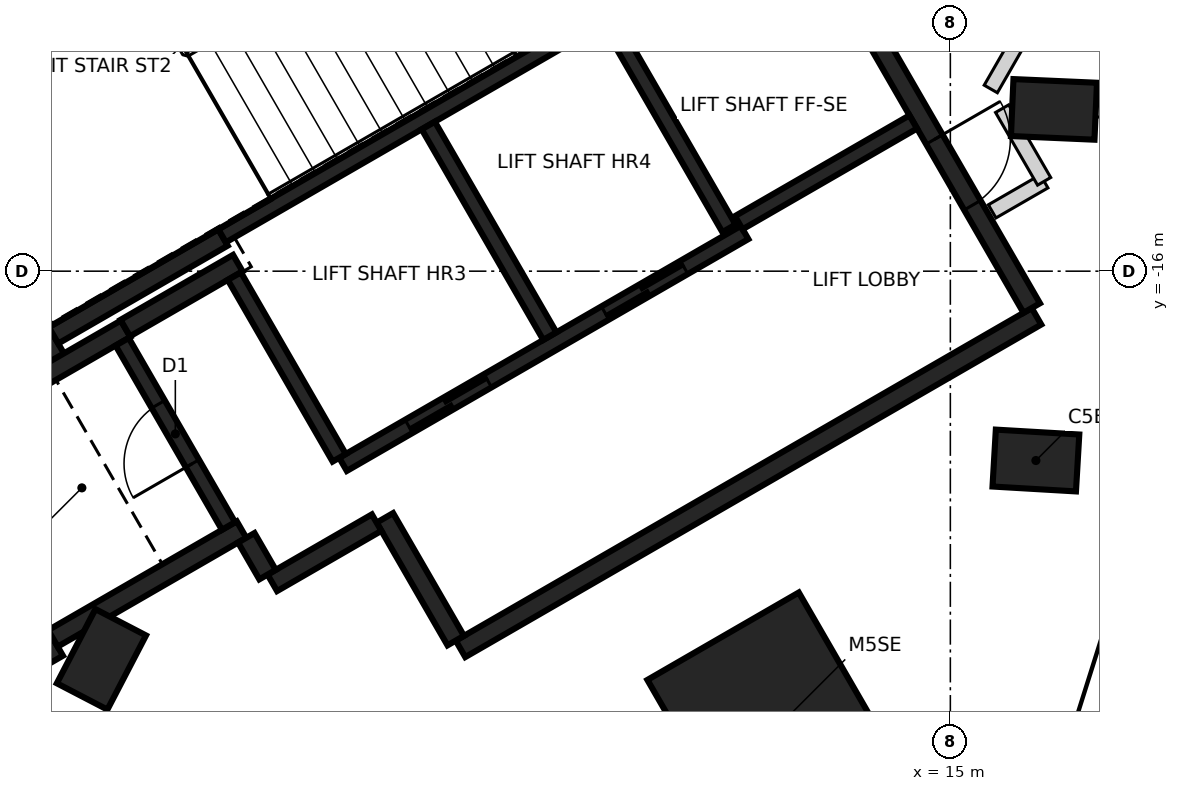
"""IFC4 building model, lengths in metres.
Left out: names, types, materials, properties, quantities, classifications, styles, units other than length and angle.
Written with IfcOpenShell. Run it as: python <this file> out.ifc"""

import sys

from ifc_helpers import new_model, si_unit, direction, frame, frame_2d, origin, origin_2d, place, context, subcontext, project, spatial, rectangle, extrude, element, fill, save


model = new_model("IFC4")
c1 = context("Model", 3, precision=1e-05, world=origin(), true_north=direction((0.0, 1.0)))
c2 = subcontext(c1, "Body", "Model", "MODEL_VIEW")
j1 = project(units=[si_unit("LENGTHUNIT", "METRE"), si_unit("PLANEANGLEUNIT", "RADIAN")], contexts=[c1])
p1 = place(None, origin())
s1 = spatial("IfcSite", under=j1, at=p1, CompositionType="ELEMENT")
p2 = place(p1, origin())
s2 = spatial("IfcBuilding", under=s1, at=p2, CompositionType="ELEMENT")
p3 = place(p2, frame((0.0, 0.0, 250.2)))
s3 = spatial("IfcBuildingStorey", under=s2, at=p3, CompositionType="ELEMENT", Elevation=250.2)
for number, where, z_axis, x_axis in (
    (1, (16.125, -18.491, -0.35), (0.0, 0.0, 1.0), (-0.998, 0.058, 0.0)),
    (2, (16.363, -13.872, -0.35), (0.0, 0.0, 1.0), (-0.999, 0.044, 0.0)),
    (3, (3.832, -21.107, -0.35), (0.0, 0.0, 1.0), (0.461, 0.887, 0.0)),
):
    element("IfcColumn", number, at=place(p3, frame(where, z_axis=z_axis, x_axis=x_axis)), inside=s3, PredefinedType="COLUMN", context=c2, shape_type="SweptSolid", body=[
        extrude(rectangle(XDim=1.1, YDim=0.75, at=origin_2d()), origin(), (0.0, 0.0, 1.0), 3.6),
    ])
p4 = place(p3, frame((12.71, -22.015, -0.35), z_axis=(0.0, 0.0, 1.0), x_axis=(-0.5, 0.866025403784, 0.0)))
e4 = element("IfcColumn", 4, at=p4, inside=s3, PredefinedType="COLUMN", context=c2, shape_type="SweptSolid", body=[
    extrude(rectangle(XDim=2.8, YDim=2.3, at=origin_2d()), origin(), (0.0, 0.0, 1.0), 3.6),
])
p5 = place(p3, frame((16.133, -16.594, 0.0), z_axis=(0.0, 0.0, 1.0), x_axis=(-0.866022959057, -0.500004234368, 0.0)))
e5 = element("IfcWall", 5, at=p5, inside=s3, PredefinedType="SHEAR", context=c2, shape_type="SweptSolid", body=[
    extrude(rectangle(XDim=8.75, YDim=0.25, at=frame_2d((4.375, 0.0))), origin(), (0.0, 0.0, 1.0), 3.25),
])
p6 = place(p3, frame((13.008, -11.181, 0.0), z_axis=(0.0, 0.0, 1.0), x_axis=(0.500001955336, -0.866024274868, 0.0)))
e6 = element("IfcWall", 6, at=p6, inside=s3, PredefinedType="SHEAR", context=c2, shape_type="SweptSolid", body=[
    extrude(rectangle(XDim=6.125, YDim=0.25, at=frame_2d((3.062, 0.0))), origin(), (0.0, 0.0, 1.0), 3.25),
])
p7 = place(p6, frame((3.563, 0.0, 0.0)))
e7 = element("IfcOpeningElement", 7, at=p7, cuts=e6, PredefinedType="OPENING", context=c2, shape_type="SweptSolid", body=[
    extrude(rectangle(XDim=1.0, YDim=2.1, at=frame_2d((0.5, 1.05))), frame((0.0, 0.135, 0.0), z_axis=(0.0, -1.0, 0.0), x_axis=(1.0, 0.0, 0.0)), (0.0, 0.0, 1.0), 0.27),
])
p8 = place(p3, frame((3.235, -17.153, 0.0), z_axis=(0.0, 0.0, 1.0), x_axis=(-0.500008851346, 0.866020293397, 0.0)))
e8 = element("IfcWall", 8, at=p8, inside=s3, PredefinedType="SHEAR", context=c2, shape_type="SweptSolid", body=[
    extrude(rectangle(XDim=5.51, YDim=0.25, at=frame_2d((2.755, 0.0))), origin(), (0.0, 0.0, 1.0), 3.25),
])
p9 = place(p3, frame((3.217, -21.122, 0.0), z_axis=(0.0, 0.0, 1.0), x_axis=(-0.499998874531, 0.866026053573, 0.0)))
e9 = element("IfcWall", 9, at=p9, inside=s3, PredefinedType="SHEAR", context=c2, shape_type="SweptSolid", body=[
    extrude(rectangle(XDim=3.313, YDim=0.25, at=frame_2d((1.656, 0.0))), origin(), (0.0, 0.0, 1.0), 3.25),
])
p10 = place(p3, frame((1.669, -18.19, 0.0), z_axis=(0.0, 0.0, 1.0), x_axis=(0.866042235819, 0.499970844928, 0.0)))
e10 = element("IfcWall", 10, at=p10, inside=s3, PredefinedType="SHEAR", context=c2, shape_type="SweptSolid", body=[
    extrude(rectangle(XDim=2.865, YDim=0.25, at=frame_2d((1.432, 0.0))), origin(), (0.0, 0.0, 1.0), 3.25),
])
p11 = place(p3, frame((5.675, -19.399, 0.0), z_axis=(0.0, 0.0, 1.0), x_axis=(-0.866026637627, -0.499997862916, 0.0)))
e11 = element("IfcWall", 11, at=p11, inside=s3, PredefinedType="SHEAR", context=c2, shape_type="SweptSolid", body=[
    extrude(rectangle(XDim=2.865, YDim=0.25, at=frame_2d((1.432, 0.0))), origin(), (0.0, 0.0, 1.0), 3.25),
])
p12 = place(p3, frame((5.431, -15.556, 0.0), z_axis=(0.0, 0.0, 1.0), x_axis=(-0.866022940537, -0.500004266446, 0.0)))
e12 = element("IfcWall", 12, at=p12, inside=s3, PredefinedType="SHEAR", context=c2, shape_type="SweptSolid", body=[
    extrude(rectangle(XDim=2.575, YDim=0.25, at=frame_2d((1.287, 0.0))), origin(), (0.0, 0.0, 1.0), 3.25),
])
p13 = place(p3, frame((8.493, -20.86, 0.0), z_axis=(0.0, 0.0, 1.0), x_axis=(-0.500039802285, 0.866002422705, 0.0)))
e13 = element("IfcWall", 13, at=p13, inside=s3, PredefinedType="SHEAR", context=c2, shape_type="SweptSolid", body=[
    extrude(rectangle(XDim=1.865, YDim=0.25, at=frame_2d((0.932, 0.0))), origin(), (0.0, 0.0, 1.0), 3.25),
])
p14 = place(p3, frame((4.145, -16.749, 0.0), z_axis=(0.0, 0.0, 1.0), x_axis=(0.866038183914, 0.499977863513, 0.0)))
e14 = element("IfcWall", 14, at=p14, inside=s3, PredefinedType="SHEAR", context=c2, shape_type="SweptSolid", body=[
    extrude(rectangle(XDim=1.71, YDim=0.25, at=frame_2d((0.855, 0.0))), origin(), (0.0, 0.0, 1.0), 3.25),
])
p15 = place(p3, frame((7.452, -19.308, 0.0), z_axis=(0.0, 0.0, 1.0), x_axis=(-0.866044474677, -0.49996696679, 0.0)))
e15 = element("IfcWall", 15, at=p15, inside=s3, PredefinedType="SHEAR", context=c2, shape_type="SweptSolid", body=[
    extrude(rectangle(XDim=1.584, YDim=0.25, at=frame_2d((0.792, 0.0))), origin(), (0.0, 0.0, 1.0), 3.25),
])
p16 = place(p3, frame((6.017, -19.992, 0.0), z_axis=(0.0, 0.0, 1.0), x_axis=(-0.500364886717, 0.865814633822, 0.0)))
e16 = element("IfcWall", 16, at=p16, inside=s3, PredefinedType="SHEAR", context=c2, shape_type="SweptSolid", body=[
    extrude(rectangle(XDim=0.559, YDim=0.25, at=frame_2d((0.28, 0.0))), origin(), (0.0, 0.0, 1.0), 3.25),
])
p17 = place(p3, frame((5.419, -15.534, 0.0), z_axis=(0.0, 0.0, 1.0), x_axis=(0.866029065029, 0.499993658486, 0.0)))
e17 = element("IfcWall", 17, at=p17, inside=s3, PredefinedType="SHEAR", context=c2, shape_type="SweptSolid", body=[
    extrude(rectangle(XDim=5.974, YDim=0.2, at=frame_2d((2.987, 0.0))), origin(), (0.0, 0.0, 1.0), 3.25),
])
p18 = place(p3, frame((7.01, -18.542, 0.0), z_axis=(0.0, 0.0, 1.0), x_axis=(0.866030299012, 0.499991521122, 0.0)))
e18 = element("IfcWall", 18, at=p18, inside=s3, PredefinedType="SHEAR", context=c2, shape_type="SweptSolid", body=[
    extrude(rectangle(XDim=6.1, YDim=0.2, at=frame_2d((3.05, 0.0))), origin(), (0.0, 0.0, 1.0), 3.25),
])
p19 = place(p18, frame((1.0, 0.0, 0.0)))
e19 = element("IfcOpeningElement", 19, at=p19, cuts=e18, PredefinedType="OPENING", context=c2, shape_type="SweptSolid", body=[
    extrude(rectangle(XDim=1.2, YDim=2.1, at=frame_2d((0.6, 1.05))), frame((0.0, 0.11, 0.0), z_axis=(0.0, -1.0, 0.0), x_axis=(1.0, 0.0, 0.0)), (0.0, 0.0, 1.0), 0.22),
])
p20 = place(p18, frame((3.982, 0.0, 0.0)))
e20 = element("IfcOpeningElement", 20, at=p20, cuts=e18, PredefinedType="OPENING", context=c2, shape_type="SweptSolid", body=[
    extrude(rectangle(XDim=1.2, YDim=2.1, at=frame_2d((0.6, 1.05))), frame((0.0, 0.11, 0.0), z_axis=(0.0, -1.0, 0.0), x_axis=(1.0, 0.0, 0.0)), (0.0, 0.0, 1.0), 0.22),
])
p21 = place(p3, frame((8.132, -14.084, 0.0), z_axis=(0.0, 0.0, 1.0), x_axis=(0.499997778408, -0.866026686418, 0.0)))
e21 = element("IfcWall", 21, at=p21, inside=s3, PredefinedType="SHEAR", context=c2, shape_type="SweptSolid", body=[
    extrude(rectangle(XDim=3.198, YDim=0.2, at=frame_2d((1.599, 0.0))), origin(), (0.0, 0.0, 1.0), 3.25),
])
p22 = place(p3, frame((5.503, -19.352, 0.0), z_axis=(0.0, 0.0, 1.0), x_axis=(-0.499986818241, 0.866033014143, 0.0)))
e22 = element("IfcWall", 22, at=p22, inside=s3, PredefinedType="SHEAR", context=c2, shape_type="SweptSolid", body=[
    extrude(rectangle(XDim=2.798, YDim=0.2, at=frame_2d((1.399, 0.0))), origin(), (0.0, 0.0, 1.0), 3.25),
])
p23 = place(p22, frame((0.949, 0.0, 0.0)))
e23 = element("IfcOpeningElement", 23, at=p23, cuts=e22, PredefinedType="OPENING", context=c2, shape_type="SweptSolid", body=[
    extrude(rectangle(XDim=0.9, YDim=2.1, at=frame_2d((0.45, 1.05))), frame((0.0, 0.11, 0.0), z_axis=(0.0, -1.0, 0.0), x_axis=(1.0, 0.0, 0.0)), (0.0, 0.0, 1.0), 0.22),
])
p24 = place(p3, frame((6.96, -18.455, 0.0), z_axis=(0.0, 0.0, 1.0), x_axis=(-0.499926705758, 0.866067716099, 0.0)))
e24 = element("IfcWall", 24, at=p24, inside=s3, PredefinedType="SHEAR", context=c2, shape_type="SweptSolid", body=[
    extrude(rectangle(XDim=2.759, YDim=0.2, at=frame_2d((1.38, 0.0))), origin(), (0.0, 0.0, 1.0), 3.25),
])
p25 = place(p3, frame((12.088, -15.437, 0.0), z_axis=(0.0, 0.0, 1.0), x_axis=(-0.500026960575, 0.86600983753, 0.0)))
e25 = element("IfcWall", 25, at=p25, inside=s3, PredefinedType="SHEAR", context=c2, shape_type="SweptSolid", body=[
    extrude(rectangle(XDim=3.1, YDim=0.2, at=frame_2d((1.55, 0.0))), origin(), (0.0, 0.0, 1.0), 3.25),
])
p26 = place(p3, frame((14.512, -14.037, 0.0), z_axis=(0.0, 0.0, 1.0), x_axis=(-0.866018407898, -0.500012117035, 0.0)))
e26 = element("IfcWall", 26, at=p26, inside=s3, PredefinedType="SHEAR", context=c2, shape_type="SweptSolid", body=[
    extrude(rectangle(XDim=2.651, YDim=0.2, at=frame_2d((1.325, 0.0))), origin(), (0.0, 0.0, 1.0), 3.25),
])
p27 = place(p3, frame((15.55, -15.213, 0.0), z_axis=(0.0, 0.0, 1.0), x_axis=(0.865989998118, 0.500061319399, 0.0)))
e27 = element("IfcWall", 27, at=p27, inside=s3, PredefinedType="PARTITIONING", context=c2, shape_type="SweptSolid", body=[
    extrude(rectangle(XDim=0.79, YDim=0.2, at=frame_2d((0.395, 0.0))), origin(), (0.0, 0.0, 1.0), 2.35),
])
p28 = place(p3, frame((15.532, -13.603, 0.0), z_axis=(0.0, 0.0, 1.0), x_axis=(0.498203662485, 0.867060038686, 0.0)))
e28 = element("IfcWall", 28, at=p28, inside=s3, PredefinedType="PARTITIONING", context=c2, shape_type="SweptSolid", body=[
    extrude(rectangle(XDim=0.789, YDim=0.2, at=frame_2d((0.395, 0.0))), origin(), (0.0, 0.0, 1.0), 3.25),
])
p29 = place(p3, frame((15.681, -13.862, 0.0), z_axis=(0.0, 0.0, 1.0), x_axis=(0.500678970179, -0.86563304513, 0.0)))
e29 = element("IfcWall", 29, at=p29, inside=s3, PredefinedType="PARTITIONING", context=c2, shape_type="SweptSolid", body=[
    extrude(rectangle(XDim=1.104, YDim=0.2, at=frame_2d((0.552, 0.0))), origin(), (0.0, 0.0, 1.0), 2.35),
])
p30 = place(p3, frame((17.933, -13.872, 0.0), z_axis=(0.0, 0.0, 1.0), x_axis=(-1.0, 0.0, 0.0)))
e30 = element("IfcWall", 30, at=p30, inside=s3, PredefinedType="PARTITIONING", context=c2, shape_type="SweptSolid", body=[
    extrude(rectangle(XDim=1.899, YDim=0.2, at=frame_2d((0.95, 0.0))), origin(), (0.0, 0.0, 1.0), 3.25),
])
p31 = place(p19, origin())
e31 = element("IfcDoor", 31, at=p31, inside=s3, OperationType="DOUBLE_DOOR_SLIDING", PredefinedType="DOOR", context=c2, shape_type="SweptSolid", body=[
    extrude(rectangle(XDim=1.2, YDim=2.1, at=frame_2d((0.6, 1.05))), frame((0.0, 0.025, 0.0), z_axis=(0.0, -1.0, 0.0), x_axis=(1.0, 0.0, 0.0)), (0.0, 0.0, 1.0), 0.05),
])
fill(e19, e31)
p32 = place(p20, origin())
e32 = element("IfcDoor", 32, at=p32, inside=s3, OperationType="DOUBLE_DOOR_SLIDING", PredefinedType="DOOR", context=c2, shape_type="SweptSolid", body=[
    extrude(rectangle(XDim=1.2, YDim=2.1, at=frame_2d((0.6, 1.05))), frame((0.0, 0.025, 0.0), z_axis=(0.0, -1.0, 0.0), x_axis=(1.0, 0.0, 0.0)), (0.0, 0.0, 1.0), 0.05),
])
fill(e20, e32)
p33 = place(p7, origin())
e33 = element("IfcDoor", 33, at=p33, inside=s3, OperationType="SINGLE_SWING_LEFT", PredefinedType="DOOR", context=c2, shape_type="SweptSolid", body=[
    extrude(rectangle(XDim=1.0, YDim=2.1, at=frame_2d((0.5, 1.05))), frame((0.0, 0.025, 0.0), z_axis=(0.0, -1.0, 0.0), x_axis=(1.0, 0.0, 0.0)), (0.0, 0.0, 1.0), 0.05),
])
fill(e7, e33)
p34 = place(p23, origin())
e34 = element("IfcDoor", 34, at=p34, inside=s3, OperationType="SINGLE_SWING_RIGHT", PredefinedType="DOOR", context=c2, shape_type="SweptSolid", body=[
    extrude(rectangle(XDim=0.9, YDim=2.1, at=frame_2d((0.45, 1.05))), frame((0.0, 0.025, 0.0), z_axis=(0.0, -1.0, 0.0), x_axis=(1.0, 0.0, 0.0)), (0.0, 0.0, 1.0), 0.05),
])
fill(e23, e34)
save(model, sys.argv[1])
